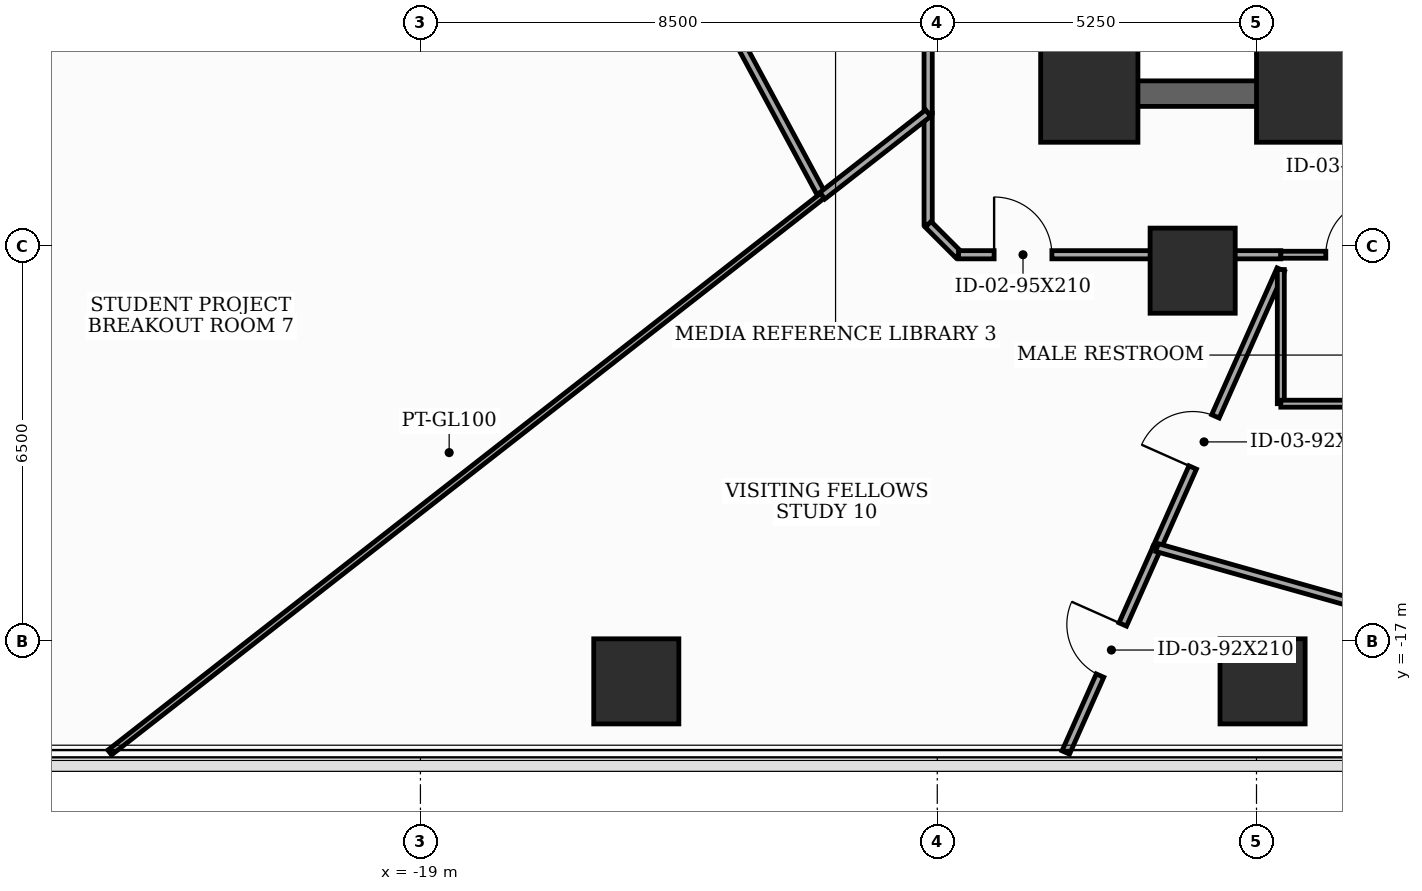
"""IFC4 building model, lengths in metres.
Left out: names, types, materials, properties, quantities, classifications, styles, units other than length and angle.
Written with IfcOpenShell. Run it as: python <this file> out.ifc"""

import sys

from ifc_helpers import new_model, si_unit, direction, frame, frame_2d, origin, origin_2d, place, context, subcontext, project, spatial, rectangle, extrude, element, fill, save


model = new_model("IFC4")
c1 = context("Model", 3, precision=1e-05, world=origin(), true_north=direction((0.0, 1.0)))
c2 = subcontext(c1, "Body", "Model", "MODEL_VIEW")
j1 = project(units=[si_unit("LENGTHUNIT", "METRE"), si_unit("PLANEANGLEUNIT", "RADIAN")], contexts=[c1])
p1 = place(None, origin())
s1 = spatial("IfcSite", under=j1, at=p1, CompositionType="ELEMENT")
p2 = place(p1, origin())
s2 = spatial("IfcBuilding", under=s1, at=p2, CompositionType="ELEMENT")
p3 = place(p2, frame((0.0, 0.0, 48.2)))
s3 = spatial("IfcBuildingStorey", under=s2, at=p3, CompositionType="ELEMENT", Elevation=48.2)
for number, where, z_axis, x_axis in (
    (1, (-8.0, -8.0, 0.0), (0.0, 0.0, 1.0), (1.0, 0.0, 0.0)),
    (2, (-4.45, -8.0, 0.0), (0.0, 0.0, 1.0), (1.0, 0.0, 0.0)),
):
    element("IfcColumn", number, at=place(p3, frame(where, z_axis=z_axis, x_axis=x_axis)), inside=s3, PredefinedType="COLUMN", context=c2, shape_type="SweptSolid", body=[
        extrude(rectangle(XDim=1.6, YDim=1.6, at=origin_2d()), origin(), (0.0, 0.0, 1.0), 3.7),
    ])
for number, where, z_axis, x_axis in (
    (3, (-6.3, -10.912, 0.0), (0.0, 0.0, 1.0), (1.0, 0.0, 0.0)),
    (4, (-15.45, -17.667, 0.0), (0.0, 0.0, 1.0), (1.0, 0.0, 0.0)),
    (5, (-5.15, -17.667, 0.0), (0.0, 0.0, 1.0), (1.0, 0.0, 0.0)),
):
    element("IfcColumn", number, at=place(p3, frame(where, z_axis=z_axis, x_axis=x_axis)), inside=s3, PredefinedType="COLUMN", context=c2, shape_type="SweptSolid", body=[
        extrude(rectangle(XDim=1.4, YDim=1.4, at=origin_2d()), origin(), (0.0, 0.0, 1.0), 3.7),
    ])
p4 = place(p3, frame((-8.0, -8.0, 0.0), z_axis=(0.0, 0.0, 1.0), x_axis=(0.0, 1.0, 0.0)))
e6 = element("IfcWall", 6, at=p4, inside=s3, PredefinedType="SHEAR", context=c2, shape_type="SweptSolid", body=[
    extrude(rectangle(XDim=16.0, YDim=0.42, at=frame_2d((8.0, 0.0))), origin(), (0.0, 0.0, 1.0), 3.5),
])
p5 = place(p4, frame((1.002, 0.0, 0.0)))
e7 = element("IfcOpeningElement", 7, at=p5, cuts=e6, PredefinedType="OPENING", context=c2, shape_type="SweptSolid", body=[
    extrude(rectangle(XDim=0.85, YDim=2.02, at=frame_2d((0.425, 1.01))), frame((0.0, 0.22, 0.0), z_axis=(0.0, -1.0, 0.0), x_axis=(1.0, 0.0, 0.0)), (0.0, 0.0, 1.0), 0.44),
])
p6 = place(p4, frame((5.35, 0.0, 0.0)))
e8 = element("IfcOpeningElement", 8, at=p6, cuts=e6, PredefinedType="OPENING", context=c2, shape_type="SweptSolid", body=[
    extrude(rectangle(XDim=1.05, YDim=2.15, at=frame_2d((0.525, 1.075))), frame((0.0, 0.22, 0.0), z_axis=(0.0, -1.0, 0.0), x_axis=(1.0, 0.0, 0.0)), (0.0, 0.0, 1.0), 0.44),
])
p7 = place(p3, frame((-8.0, -8.0, 0.0), z_axis=(0.0, 0.0, 1.0), x_axis=(1.0, 0.0, 0.0)))
e9 = element("IfcWall", 9, at=p7, inside=s3, PredefinedType="SHEAR", context=c2, shape_type="SweptSolid", body=[
    extrude(rectangle(XDim=16.0, YDim=0.42, at=frame_2d((8.0, 0.0))), origin(), (0.0, 0.0, 1.0), 3.5),
])
p8 = place(p7, frame((4.529, 0.0, 0.0)))
e10 = element("IfcOpeningElement", 10, at=p8, cuts=e9, PredefinedType="OPENING", context=c2, shape_type="SweptSolid", body=[
    extrude(rectangle(XDim=0.85, YDim=2.02, at=frame_2d((0.425, 1.01))), frame((0.0, 0.22, 0.0), z_axis=(0.0, -1.0, 0.0), x_axis=(1.0, 0.0, 0.0)), (0.0, 0.0, 1.0), 0.44),
])
p9 = place(p7, frame((6.49, 0.0, 0.0)))
e11 = element("IfcOpeningElement", 11, at=p9, cuts=e9, PredefinedType="OPENING", context=c2, shape_type="SweptSolid", body=[
    extrude(rectangle(XDim=0.85, YDim=2.02, at=frame_2d((0.425, 1.01))), frame((0.0, 0.22, 0.0), z_axis=(0.0, -1.0, 0.0), x_axis=(1.0, 0.0, 0.0)), (0.0, 0.0, 1.0), 0.44),
])
p10 = place(p7, frame((8.69, 0.0, 0.0)))
e12 = element("IfcOpeningElement", 12, at=p10, cuts=e9, PredefinedType="OPENING", context=c2, shape_type="SweptSolid", body=[
    extrude(rectangle(XDim=0.85, YDim=2.02, at=frame_2d((0.425, 1.01))), frame((0.0, 0.22, 0.0), z_axis=(0.0, -1.0, 0.0), x_axis=(1.0, 0.0, 0.0)), (0.0, 0.0, 1.0), 0.44),
])
p11 = place(p7, frame((10.621, 0.0, 0.0)))
e13 = element("IfcOpeningElement", 13, at=p11, cuts=e9, PredefinedType="OPENING", context=c2, shape_type="SweptSolid", body=[
    extrude(rectangle(XDim=0.85, YDim=2.02, at=frame_2d((0.425, 1.01))), frame((0.0, 0.22, 0.0), z_axis=(0.0, -1.0, 0.0), x_axis=(1.0, 0.0, 0.0)), (0.0, 0.0, 1.0), 0.44),
])
p12 = place(p3, frame((-4.45, -7.79, 0.0), z_axis=(0.0, 0.0, 1.0), x_axis=(0.0, 1.0, 0.0)))
e14 = element("IfcWall", 14, at=p12, inside=s3, PredefinedType="SHEAR", context=c2, shape_type="SweptSolid", body=[
    extrude(rectangle(XDim=15.58, YDim=0.3, at=frame_2d((7.79, 0.0))), origin(), (0.0, 0.0, 1.0), 3.5),
])
p13 = place(p3, frame((-10.65, -3.992, 0.0), z_axis=(0.0, 0.0, 1.0), x_axis=(0.0, -1.0, 0.0)))
e15 = element("IfcWall", 15, at=p13, inside=s3, PredefinedType="PARTITIONING", context=c2, shape_type="SweptSolid", body=[
    extrude(rectangle(XDim=4.329, YDim=0.135, at=frame_2d((2.165, 0.0))), origin(), (0.0, 0.0, 1.0), 2.785),
])
p14 = place(p3, frame((-10.65, -8.321, 0.0), z_axis=(0.0, 0.0, 1.0), x_axis=(0.0, -1.0, 0.0)))
e16 = element("IfcWall", 16, at=p14, inside=s3, PredefinedType="PARTITIONING", context=c2, shape_type="SweptSolid", body=[
    extrude(rectangle(XDim=1.829, YDim=0.135, at=frame_2d((0.915, 0.0))), origin(), (0.0, 0.0, 1.0), 3.5),
])
p15 = place(p3, frame((-10.65, -10.15, 0.0), z_axis=(0.0, 0.0, 1.0), x_axis=(0.707106781187, -0.707106781187, 0.0)))
e17 = element("IfcWall", 17, at=p15, inside=s3, PredefinedType="PARTITIONING", context=c2, shape_type="SweptSolid", body=[
    extrude(rectangle(XDim=0.707, YDim=0.135, at=frame_2d((0.354, 0.0))), origin(), (0.0, 0.0, 1.0), 3.5),
])
p16 = place(p3, frame((-10.15, -10.65, 0.0), z_axis=(0.0, 0.0, 1.0), x_axis=(1.0, 0.0, 0.0)))
e18 = element("IfcWall", 18, at=p16, inside=s3, PredefinedType="PARTITIONING", context=c2, shape_type="SweptSolid", body=[
    extrude(rectangle(XDim=5.3, YDim=0.135, at=frame_2d((2.65, 0.0))), origin(), (0.0, 0.0, 1.0), 2.785),
])
p17 = place(p16, frame((0.585, 0.0, 0.0)))
e19 = element("IfcOpeningElement", 19, at=p17, cuts=e18, PredefinedType="OPENING", context=c2, shape_type="SweptSolid", body=[
    extrude(rectangle(XDim=0.95, YDim=2.1, at=frame_2d((0.475, 1.05))), frame((0.0, 0.077, 0.0), z_axis=(0.0, -1.0, 0.0), x_axis=(1.0, 0.0, 0.0)), (0.0, 0.0, 1.0), 0.155),
])
p18 = place(p3, frame((-4.85, -10.65, 0.0), z_axis=(0.0, 0.0, 1.0), x_axis=(1.0, 0.0, 0.0)))
e20 = element("IfcWall", 20, at=p18, inside=s3, PredefinedType="PARTITIONING", context=c2, shape_type="SweptSolid", body=[
    extrude(rectangle(XDim=2.4, YDim=0.115, at=frame_2d((1.2, 0.0))), origin(), (0.0, 0.0, 1.0), 3.5),
])
p19 = place(p18, frame((0.74, 0.0, 0.0)))
e21 = element("IfcOpeningElement", 21, at=p19, cuts=e20, PredefinedType="OPENING", context=c2, shape_type="SweptSolid", body=[
    extrude(rectangle(XDim=0.92, YDim=2.1, at=frame_2d((0.46, 1.05))), frame((0.0, 0.067, 0.0), z_axis=(0.0, -1.0, 0.0), x_axis=(1.0, 0.0, 0.0)), (0.0, 0.0, 1.0), 0.135),
])
p20 = place(p3, frame((-14.851, -5.118, 0.0), z_axis=(0.0, 0.0, 1.0), x_axis=(0.474543506137, -0.880232049395, 0.0)))
e22 = element("IfcWall", 22, at=p20, inside=s3, PredefinedType="PARTITIONING", context=c2, shape_type="SweptSolid", body=[
    extrude(rectangle(XDim=5.184, YDim=0.135, at=frame_2d((2.592, 0.0))), origin(), (0.0, 0.0, 1.0), 3.5),
])
p21 = place(p3, frame((-12.391, -9.681, 0.0), z_axis=(0.0, 0.0, 1.0), x_axis=(0.788124883644, 0.615515367624, 0.0)))
e23 = element("IfcWall", 23, at=p21, inside=s3, PredefinedType="PARTITIONING", context=c2, shape_type="SweptSolid", body=[
    extrude(rectangle(XDim=2.209, YDim=0.135, at=frame_2d((1.104, 0.0))), origin(), (0.0, 0.0, 1.0), 3.5),
])
p22 = place(p3, frame((-24.11, -18.837, 0.0), z_axis=(0.0, 0.0, 1.0), x_axis=(0.788000479848, 0.615674624911, 0.0)))
e24 = element("IfcWall", 24, at=p22, inside=s3, PredefinedType="MOVABLE", context=c2, shape_type="SweptSolid", body=[
    extrude(rectangle(XDim=14.872, YDim=0.1, at=frame_2d((7.436, 0.0))), origin(), (0.0, 0.0, 1.0), 2.935),
])
p23 = place(p3, frame((-8.387, -18.837, 0.0), z_axis=(0.0, 0.0, 1.0), x_axis=(0.406721597958, 0.913552156012, 0.0)))
e25 = element("IfcWall", 25, at=p23, inside=s3, PredefinedType="PARTITIONING", context=c2, shape_type="SweptSolid", body=[
    extrude(rectangle(XDim=3.69, YDim=0.135, at=frame_2d((1.845, 0.0))), origin(), (0.0, 0.0, 1.0), 2.935),
])
p24 = place(p23, frame((1.385, 0.0, 0.0)))
e26 = element("IfcOpeningElement", 26, at=p24, cuts=e25, PredefinedType="OPENING", context=c2, shape_type="SweptSolid", body=[
    extrude(rectangle(XDim=0.92, YDim=2.1, at=frame_2d((0.46, 1.05))), frame((0.0, 0.077, 0.0), z_axis=(0.0, -1.0, 0.0), x_axis=(1.0, 0.0, 0.0)), (0.0, 0.0, 1.0), 0.155),
])
p25 = place(p3, frame((-6.886, -15.466, 0.0), z_axis=(0.0, 0.0, 1.0), x_axis=(0.406713095633, 0.913555941276, 0.0)))
e27 = element("IfcWall", 27, at=p25, inside=s3, PredefinedType="PARTITIONING", context=c2, shape_type="SweptSolid", body=[
    extrude(rectangle(XDim=5.006, YDim=0.135, at=frame_2d((2.503, 0.0))), origin(), (0.0, 0.0, 1.0), 2.685),
])
p26 = place(p25, frame((1.442, 0.0, 0.0)))
e28 = element("IfcOpeningElement", 28, at=p26, cuts=e27, PredefinedType="OPENING", context=c2, shape_type="SweptSolid", body=[
    extrude(rectangle(XDim=0.92, YDim=2.1, at=frame_2d((0.46, 1.05))), frame((0.0, 0.077, 0.0), z_axis=(0.0, -1.0, 0.0), x_axis=(1.0, 0.0, 0.0)), (0.0, 0.0, 1.0), 0.155),
])
p27 = place(p3, frame((-4.85, -10.893, 0.0), z_axis=(0.0, 0.0, 1.0), x_axis=(0.0, -1.0, 0.0)))
e29 = element("IfcWall", 29, at=p27, inside=s3, PredefinedType="PARTITIONING", context=c2, shape_type="SweptSolid", body=[
    extrude(rectangle(XDim=2.207, YDim=0.115, at=frame_2d((1.104, 0.0))), origin(), (0.0, 0.0, 1.0), 2.785),
])
p28 = place(p3, frame((-4.85, -13.1, 0.0), z_axis=(0.0, 0.0, 1.0), x_axis=(1.0, 0.0, 0.0)))
e30 = element("IfcWall", 30, at=p28, inside=s3, PredefinedType="PARTITIONING", context=c2, shape_type="SweptSolid", body=[
    extrude(rectangle(XDim=2.4, YDim=0.115, at=frame_2d((1.2, 0.0))), origin(), (0.0, 0.0, 1.0), 3.5),
])
p29 = place(p3, frame((-1.777, -16.907, 0.0), z_axis=(0.0, 0.0, 1.0), x_axis=(-0.962452140865, 0.271451425757, 0.0)))
e31 = element("IfcWall", 31, at=p29, inside=s3, PredefinedType="PARTITIONING", context=c2, shape_type="SweptSolid", body=[
    extrude(rectangle(XDim=5.308, YDim=0.135, at=frame_2d((2.654, 0.0))), origin(), (0.0, 0.0, 1.0), 2.685),
])
p30 = place(p17, origin())
e32 = element("IfcDoor", 32, at=p30, inside=s3, OperationType="SINGLE_SWING_LEFT", PredefinedType="DOOR", context=c2, shape_type="SweptSolid", body=[
    extrude(rectangle(XDim=0.95, YDim=2.1, at=frame_2d((0.475, 1.05))), frame((0.0, 0.025, 0.0), z_axis=(0.0, -1.0, 0.0), x_axis=(1.0, 0.0, 0.0)), (0.0, 0.0, 1.0), 0.05),
])
fill(e19, e32)
p31 = place(p19, origin())
e33 = element("IfcDoor", 33, at=p31, inside=s3, OperationType="SINGLE_SWING_RIGHT", PredefinedType="DOOR", context=c2, shape_type="SweptSolid", body=[
    extrude(rectangle(XDim=0.92, YDim=2.1, at=frame_2d((0.46, 1.05))), frame((0.0, 0.025, 0.0), z_axis=(0.0, -1.0, 0.0), x_axis=(1.0, 0.0, 0.0)), (0.0, 0.0, 1.0), 0.05),
])
fill(e21, e33)
p32 = place(p24, origin())
e34 = element("IfcDoor", 34, at=p32, inside=s3, OperationType="SINGLE_SWING_RIGHT", PredefinedType="DOOR", context=c2, shape_type="SweptSolid", body=[
    extrude(rectangle(XDim=0.92, YDim=2.1, at=frame_2d((0.46, 1.05))), frame((0.0, 0.025, 0.0), z_axis=(0.0, -1.0, 0.0), x_axis=(1.0, 0.0, 0.0)), (0.0, 0.0, 1.0), 0.05),
])
fill(e26, e34)
p33 = place(p26, origin())
e35 = element("IfcDoor", 35, at=p33, inside=s3, OperationType="SINGLE_SWING_LEFT", PredefinedType="DOOR", context=c2, shape_type="SweptSolid", body=[
    extrude(rectangle(XDim=0.92, YDim=2.1, at=frame_2d((0.46, 1.05))), frame((0.0, 0.025, 0.0), z_axis=(0.0, -1.0, 0.0), x_axis=(1.0, 0.0, 0.0)), (0.0, 0.0, 1.0), 0.05),
])
fill(e28, e35)
save(model, sys.argv[1])
